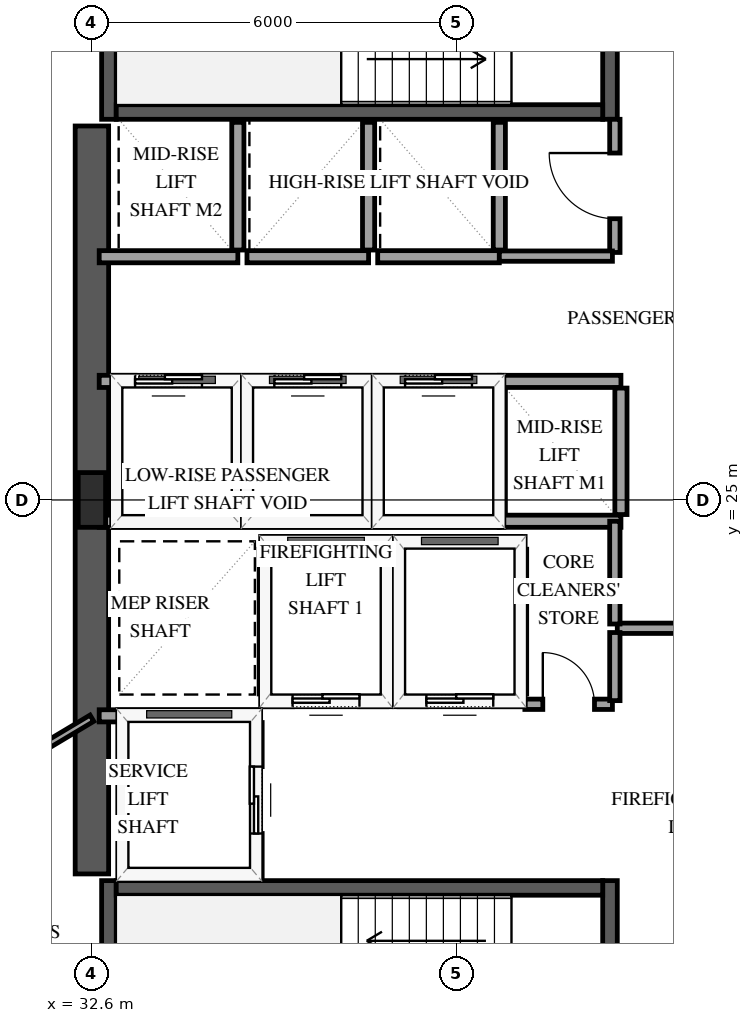
"""IFC4 building model, lengths in metres.
Left out: names, types, materials, properties, quantities, classifications, styles, units other than length and angle.
Written with IfcOpenShell. Run it as: python <this file> out.ifc"""

import sys

from ifc_helpers import new_model, si_unit, direction, frame, frame_2d, origin, origin_2d, place, context, subcontext, project, spatial, rectangle, extrude, element, fill, save


model = new_model("IFC4")
c1 = context("Model", 3, precision=1e-05, world=origin(), true_north=direction((0.0, 1.0)))
c2 = subcontext(c1, "Body", "Model", "MODEL_VIEW")
j1 = project(units=[si_unit("LENGTHUNIT", "METRE"), si_unit("PLANEANGLEUNIT", "RADIAN")], contexts=[c1])
p1 = place(None, origin())
s1 = spatial("IfcSite", under=j1, at=p1, CompositionType="ELEMENT")
p2 = place(p1, origin())
s2 = spatial("IfcBuilding", under=s1, at=p2, CompositionType="ELEMENT")
p3 = place(p2, frame((0.0, 0.0, 106.9)))
s3 = spatial("IfcBuildingStorey", under=s2, at=p3, CompositionType="ELEMENT", Elevation=106.9)
p4 = place(p3, frame((32.88, 15.11, 0.0), z_axis=(0.0, 0.0, 1.0), x_axis=(0.0, 1.0, 0.0)))
e1 = element("IfcWall", 1, at=p4, inside=s3, PredefinedType="SHEAR", context=c2, shape_type="SweptSolid", body=[
    extrude(rectangle(XDim=3.63, YDim=0.24, at=frame_2d((1.815, 0.0))), origin(), (0.0, 0.0, 1.0), 3.9),
])
p5 = place(p3, frame((41.12, 15.11, 0.0), z_axis=(0.0, 0.0, 1.0), x_axis=(0.0, 1.0, 0.0)))
e2 = element("IfcWall", 2, at=p5, inside=s3, PredefinedType="SHEAR", context=c2, shape_type="SweptSolid", body=[
    extrude(rectangle(XDim=3.63, YDim=0.24, at=frame_2d((1.815, 0.0))), origin(), (0.0, 0.0, 1.0), 3.9),
])
p6 = place(p5, frame((1.255, 0.0, 0.0)))
e3 = element("IfcOpeningElement", 3, at=p6, cuts=e2, PredefinedType="OPENING", context=c2, shape_type="SweptSolid", body=[
    extrude(rectangle(XDim=1.12, YDim=2.15, at=frame_2d((0.56, 1.075))), frame((0.0, 0.13, 0.0), z_axis=(0.0, -1.0, 0.0), x_axis=(1.0, 0.0, 0.0)), (0.0, 0.0, 1.0), 0.26),
])
p7 = place(p3, frame((33.0, 18.62, 0.0), z_axis=(0.0, 0.0, 1.0), x_axis=(1.0, 0.0, 0.0)))
e4 = element("IfcWall", 4, at=p7, inside=s3, PredefinedType="SHEAR", context=c2, shape_type="SweptSolid", body=[
    extrude(rectangle(XDim=8.0, YDim=0.24, at=frame_2d((4.0, 0.0))), origin(), (0.0, 0.0, 1.0), 3.9),
])
p8 = place(p3, frame((32.88, 31.26, 0.0), z_axis=(0.0, 0.0, 1.0), x_axis=(0.0, 1.0, 0.0)))
e5 = element("IfcWall", 5, at=p8, inside=s3, PredefinedType="SHEAR", context=c2, shape_type="SweptSolid", body=[
    extrude(rectangle(XDim=3.63, YDim=0.24, at=frame_2d((1.815, 0.0))), origin(), (0.0, 0.0, 1.0), 3.9),
])
p9 = place(p3, frame((41.12, 31.26, 0.0), z_axis=(0.0, 0.0, 1.0), x_axis=(0.0, 1.0, 0.0)))
e6 = element("IfcWall", 6, at=p9, inside=s3, PredefinedType="SHEAR", context=c2, shape_type="SweptSolid", body=[
    extrude(rectangle(XDim=3.63, YDim=0.24, at=frame_2d((1.815, 0.0))), origin(), (0.0, 0.0, 1.0), 3.9),
])
p10 = place(p9, frame((1.255, 0.0, 0.0)))
e7 = element("IfcOpeningElement", 7, at=p10, cuts=e6, PredefinedType="OPENING", context=c2, shape_type="SweptSolid", body=[
    extrude(rectangle(XDim=1.12, YDim=2.15, at=frame_2d((0.56, 1.075))), frame((0.0, 0.13, 0.0), z_axis=(0.0, -1.0, 0.0), x_axis=(1.0, 0.0, 0.0)), (0.0, 0.0, 1.0), 0.26),
])
p11 = place(p3, frame((33.0, 31.38, 0.0), z_axis=(0.0, 0.0, 1.0), x_axis=(1.0, 0.0, 0.0)))
e8 = element("IfcWall", 8, at=p11, inside=s3, PredefinedType="SHEAR", context=c2, shape_type="SweptSolid", body=[
    extrude(rectangle(XDim=8.0, YDim=0.24, at=frame_2d((4.0, 0.0))), origin(), (0.0, 0.0, 1.0), 3.9),
])
p12 = place(p3, frame((32.6, 18.85, 0.0), z_axis=(0.0, 0.0, 1.0), x_axis=(0.0, 1.0, 0.0)))
e9 = element("IfcWall", 9, at=p12, inside=s3, PredefinedType="SHEAR", context=c2, shape_type="SweptSolid", body=[
    extrude(rectangle(XDim=12.3, YDim=0.55, at=frame_2d((6.15, 0.0))), origin(), (0.0, 0.0, 1.0), 3.9),
])
p13 = place(p3, frame((32.6, 25.0, 0.0), z_axis=(0.0, 0.0, 1.0), x_axis=(1.0, 0.0, 0.0)))
e10 = element("IfcColumn", 10, at=p13, inside=s3, PredefinedType="PILASTER", context=c2, shape_type="SweptSolid", body=[
    extrude(rectangle(XDim=0.45, YDim=0.9, at=origin_2d()), origin(), (0.0, 0.0, 1.0), 3.9),
])
p14 = place(p3, frame((35.45, 21.7, 0.0), z_axis=(0.0, 0.0, 1.0), x_axis=(1.0, 0.0, 0.0)))
e11 = element("IfcWall", 11, at=p14, inside=s3, PredefinedType="SOLIDWALL", context=c2, shape_type="SweptSolid", body=[
    extrude(rectangle(XDim=2.0, YDim=0.2, at=frame_2d((1.0, 0.0))), origin(), (0.0, 0.0, 1.0), 3.6),
])
p15 = place(p14, frame((0.45, 0.0, 0.0)))
e12 = element("IfcOpeningElement", 12, at=p15, cuts=e11, PredefinedType="OPENING", context=c2, shape_type="SweptSolid", body=[
    extrude(rectangle(XDim=1.1, YDim=2.15, at=frame_2d((0.55, 1.075))), frame((0.0, 0.11, 0.0), z_axis=(0.0, -1.0, 0.0), x_axis=(1.0, 0.0, 0.0)), (0.0, 0.0, 1.0), 0.22),
])
p16 = place(p3, frame((35.45, 24.3, 0.0), z_axis=(0.0, 0.0, 1.0), x_axis=(1.0, 0.0, 0.0)))
e13 = element("IfcWall", 13, at=p16, inside=s3, PredefinedType="SOLIDWALL", context=c2, shape_type="SweptSolid", body=[
    extrude(rectangle(XDim=2.0, YDim=0.2, at=frame_2d((1.0, 0.0))), origin(), (0.0, 0.0, 1.0), 3.6),
])
for number, where, z_axis, x_axis in (
    (14, (35.45, 21.81, 0.0), (0.0, 0.0, 1.0), (0.0, 1.0, 0.0)),
    (15, (37.45, 21.81, 0.0), (0.0, 0.0, 1.0), (0.0, 1.0, 0.0)),
):
    element("IfcWall", number, at=place(p3, frame(where, z_axis=z_axis, x_axis=x_axis)), inside=s3, PredefinedType="SOLIDWALL", context=c2, shape_type="SweptSolid", body=[
        extrude(rectangle(XDim=2.38, YDim=0.2, at=frame_2d((1.19, 0.0))), origin(), (0.0, 0.0, 1.0), 3.6),
    ])
p17 = place(p3, frame((37.65, 21.7, 0.0), z_axis=(0.0, 0.0, 1.0), x_axis=(1.0, 0.0, 0.0)))
e16 = element("IfcWall", 16, at=p17, inside=s3, PredefinedType="SOLIDWALL", context=c2, shape_type="SweptSolid", body=[
    extrude(rectangle(XDim=2.0, YDim=0.2, at=frame_2d((1.0, 0.0))), origin(), (0.0, 0.0, 1.0), 3.6),
])
p18 = place(p17, frame((0.45, 0.0, 0.0)))
e17 = element("IfcOpeningElement", 17, at=p18, cuts=e16, PredefinedType="OPENING", context=c2, shape_type="SweptSolid", body=[
    extrude(rectangle(XDim=1.1, YDim=2.15, at=frame_2d((0.55, 1.075))), frame((0.0, 0.11, 0.0), z_axis=(0.0, -1.0, 0.0), x_axis=(1.0, 0.0, 0.0)), (0.0, 0.0, 1.0), 0.22),
])
p19 = place(p3, frame((37.65, 24.3, 0.0), z_axis=(0.0, 0.0, 1.0), x_axis=(1.0, 0.0, 0.0)))
e18 = element("IfcWall", 18, at=p19, inside=s3, PredefinedType="SOLIDWALL", context=c2, shape_type="SweptSolid", body=[
    extrude(rectangle(XDim=2.0, YDim=0.2, at=frame_2d((1.0, 0.0))), origin(), (0.0, 0.0, 1.0), 3.6),
])
p20 = place(p3, frame((39.65, 21.81, 0.0), z_axis=(0.0, 0.0, 1.0), x_axis=(0.0, 1.0, 0.0)))
e19 = element("IfcWall", 19, at=p20, inside=s3, PredefinedType="SOLIDWALL", context=c2, shape_type="SweptSolid", body=[
    extrude(rectangle(XDim=2.38, YDim=0.2, at=frame_2d((1.19, 0.0))), origin(), (0.0, 0.0, 1.0), 3.6),
])
p21 = place(p3, frame((32.72, 21.45, 0.0), z_axis=(0.0, 0.0, 1.0), x_axis=(1.0, 0.0, 0.0)))
e20 = element("IfcWall", 20, at=p21, inside=s3, PredefinedType="SOLIDWALL", context=c2, shape_type="SweptSolid", body=[
    extrude(rectangle(XDim=2.58, YDim=0.2, at=frame_2d((1.29, 0.0))), origin(), (0.0, 0.0, 1.0), 3.6),
])
p22 = place(p3, frame((35.3, 18.79, 0.0), z_axis=(0.0, 0.0, 1.0), x_axis=(0.0, 1.0, 0.0)))
e21 = element("IfcWall", 21, at=p22, inside=s3, PredefinedType="SOLIDWALL", context=c2, shape_type="SweptSolid", body=[
    extrude(rectangle(XDim=2.55, YDim=0.2, at=frame_2d((1.275, 0.0))), origin(), (0.0, 0.0, 1.0), 3.6),
])
p23 = place(p22, frame((0.725, 0.0, 0.0)))
e22 = element("IfcOpeningElement", 22, at=p23, cuts=e21, PredefinedType="OPENING", context=c2, shape_type="SweptSolid", body=[
    extrude(rectangle(XDim=1.1, YDim=2.15, at=frame_2d((0.55, 1.075))), frame((0.0, 0.11, 0.0), z_axis=(0.0, -1.0, 0.0), x_axis=(1.0, 0.0, 0.0)), (0.0, 0.0, 1.0), 0.22),
])
p24 = place(p3, frame((32.72, 24.65, 0.0), z_axis=(0.0, 0.0, 1.0), x_axis=(1.0, 0.0, 0.0)))
e23 = element("IfcWall", 23, at=p24, inside=s3, PredefinedType="SOLIDWALL", context=c2, shape_type="SweptSolid", body=[
    extrude(rectangle(XDim=2.28, YDim=0.2, at=frame_2d((1.14, 0.0))), origin(), (0.0, 0.0, 1.0), 3.6),
])
p25 = place(p3, frame((32.72, 26.95, 0.0), z_axis=(0.0, 0.0, 1.0), x_axis=(1.0, 0.0, 0.0)))
e24 = element("IfcWall", 24, at=p25, inside=s3, PredefinedType="SOLIDWALL", context=c2, shape_type="SweptSolid", body=[
    extrude(rectangle(XDim=2.28, YDim=0.2, at=frame_2d((1.14, 0.0))), origin(), (0.0, 0.0, 1.0), 3.6),
])
p26 = place(p25, frame((0.59, 0.0, 0.0)))
e25 = element("IfcOpeningElement", 25, at=p26, cuts=e24, PredefinedType="OPENING", context=c2, shape_type="SweptSolid", body=[
    extrude(rectangle(XDim=1.1, YDim=2.15, at=frame_2d((0.55, 1.075))), frame((0.0, 0.11, 0.0), z_axis=(0.0, -1.0, 0.0), x_axis=(1.0, 0.0, 0.0)), (0.0, 0.0, 1.0), 0.22),
])
p27 = place(p3, frame((35.0, 24.76, 0.0), z_axis=(0.0, 0.0, 1.0), x_axis=(0.0, 1.0, 0.0)))
e26 = element("IfcWall", 26, at=p27, inside=s3, PredefinedType="SOLIDWALL", context=c2, shape_type="SweptSolid", body=[
    extrude(rectangle(XDim=2.08, YDim=0.2, at=frame_2d((1.04, 0.0))), origin(), (0.0, 0.0, 1.0), 3.6),
])
p28 = place(p3, frame((35.15, 24.65, 0.0), z_axis=(0.0, 0.0, 1.0), x_axis=(1.0, 0.0, 0.0)))
e27 = element("IfcWall", 27, at=p28, inside=s3, PredefinedType="SOLIDWALL", context=c2, shape_type="SweptSolid", body=[
    extrude(rectangle(XDim=2.0, YDim=0.2, at=frame_2d((1.0, 0.0))), origin(), (0.0, 0.0, 1.0), 3.6),
])
p29 = place(p3, frame((35.15, 26.95, 0.0), z_axis=(0.0, 0.0, 1.0), x_axis=(1.0, 0.0, 0.0)))
e28 = element("IfcWall", 28, at=p29, inside=s3, PredefinedType="SOLIDWALL", context=c2, shape_type="SweptSolid", body=[
    extrude(rectangle(XDim=2.0, YDim=0.2, at=frame_2d((1.0, 0.0))), origin(), (0.0, 0.0, 1.0), 3.6),
])
p30 = place(p29, frame((0.45, 0.0, 0.0)))
e29 = element("IfcOpeningElement", 29, at=p30, cuts=e28, PredefinedType="OPENING", context=c2, shape_type="SweptSolid", body=[
    extrude(rectangle(XDim=1.1, YDim=2.15, at=frame_2d((0.55, 1.075))), frame((0.0, 0.11, 0.0), z_axis=(0.0, -1.0, 0.0), x_axis=(1.0, 0.0, 0.0)), (0.0, 0.0, 1.0), 0.22),
])
p31 = place(p3, frame((37.15, 24.76, 0.0), z_axis=(0.0, 0.0, 1.0), x_axis=(0.0, 1.0, 0.0)))
e30 = element("IfcWall", 30, at=p31, inside=s3, PredefinedType="SOLIDWALL", context=c2, shape_type="SweptSolid", body=[
    extrude(rectangle(XDim=2.08, YDim=0.2, at=frame_2d((1.04, 0.0))), origin(), (0.0, 0.0, 1.0), 3.6),
])
p32 = place(p3, frame((37.3, 24.65, 0.0), z_axis=(0.0, 0.0, 1.0), x_axis=(1.0, 0.0, 0.0)))
e31 = element("IfcWall", 31, at=p32, inside=s3, PredefinedType="SOLIDWALL", context=c2, shape_type="SweptSolid", body=[
    extrude(rectangle(XDim=2.0, YDim=0.2, at=frame_2d((1.0, 0.0))), origin(), (0.0, 0.0, 1.0), 3.6),
])
p33 = place(p3, frame((37.3, 26.95, 0.0), z_axis=(0.0, 0.0, 1.0), x_axis=(1.0, 0.0, 0.0)))
e32 = element("IfcWall", 32, at=p33, inside=s3, PredefinedType="SOLIDWALL", context=c2, shape_type="SweptSolid", body=[
    extrude(rectangle(XDim=2.0, YDim=0.2, at=frame_2d((1.0, 0.0))), origin(), (0.0, 0.0, 1.0), 3.6),
])
p34 = place(p33, frame((0.45, 0.0, 0.0)))
e33 = element("IfcOpeningElement", 33, at=p34, cuts=e32, PredefinedType="OPENING", context=c2, shape_type="SweptSolid", body=[
    extrude(rectangle(XDim=1.1, YDim=2.15, at=frame_2d((0.55, 1.075))), frame((0.0, 0.11, 0.0), z_axis=(0.0, -1.0, 0.0), x_axis=(1.0, 0.0, 0.0)), (0.0, 0.0, 1.0), 0.22),
])
p35 = place(p3, frame((39.3, 24.76, 0.0), z_axis=(0.0, 0.0, 1.0), x_axis=(0.0, 1.0, 0.0)))
e34 = element("IfcWall", 34, at=p35, inside=s3, PredefinedType="SOLIDWALL", context=c2, shape_type="SweptSolid", body=[
    extrude(rectangle(XDim=2.08, YDim=0.2, at=frame_2d((1.04, 0.0))), origin(), (0.0, 0.0, 1.0), 3.6),
])
for number, where, z_axis, x_axis in (
    (35, (39.3, 24.65, 0.0), (0.0, 0.0, 1.0), (1.0, 0.0, 0.0)),
    (36, (39.3, 26.95, 0.0), (0.0, 0.0, 1.0), (1.0, 0.0, 0.0)),
):
    element("IfcWall", number, at=place(p3, frame(where, z_axis=z_axis, x_axis=x_axis)), inside=s3, PredefinedType="SOLIDWALL", context=c2, shape_type="SweptSolid", body=[
        extrude(rectangle(XDim=2.0, YDim=0.2, at=frame_2d((1.0, 0.0))), origin(), (0.0, 0.0, 1.0), 3.6),
    ])
p36 = place(p3, frame((41.3, 24.76, 0.0), z_axis=(0.0, 0.0, 1.0), x_axis=(0.0, 1.0, 0.0)))
e37 = element("IfcWall", 37, at=p36, inside=s3, PredefinedType="SOLIDWALL", context=c2, shape_type="SweptSolid", body=[
    extrude(rectangle(XDim=2.08, YDim=0.2, at=frame_2d((1.04, 0.0))), origin(), (0.0, 0.0, 1.0), 3.6),
])
p37 = place(p3, frame((32.72, 29.0, 0.0), z_axis=(0.0, 0.0, 1.0), x_axis=(1.0, 0.0, 0.0)))
e38 = element("IfcWall", 38, at=p37, inside=s3, PredefinedType="SOLIDWALL", context=c2, shape_type="SweptSolid", body=[
    extrude(rectangle(XDim=2.28, YDim=0.2, at=frame_2d((1.14, 0.0))), origin(), (0.0, 0.0, 1.0), 3.6),
])
p38 = place(p3, frame((35.0, 29.11, 0.0), z_axis=(0.0, 0.0, 1.0), x_axis=(0.0, 1.0, 0.0)))
e39 = element("IfcWall", 39, at=p38, inside=s3, PredefinedType="SOLIDWALL", context=c2, shape_type="SweptSolid", body=[
    extrude(rectangle(XDim=2.1, YDim=0.2, at=frame_2d((1.05, 0.0))), origin(), (0.0, 0.0, 1.0), 3.6),
])
p39 = place(p3, frame((35.15, 29.0, 0.0), z_axis=(0.0, 0.0, 1.0), x_axis=(1.0, 0.0, 0.0)))
e40 = element("IfcWall", 40, at=p39, inside=s3, PredefinedType="SOLIDWALL", context=c2, shape_type="SweptSolid", body=[
    extrude(rectangle(XDim=2.0, YDim=0.2, at=frame_2d((1.0, 0.0))), origin(), (0.0, 0.0, 1.0), 3.6),
])
p40 = place(p3, frame((37.15, 29.11, 0.0), z_axis=(0.0, 0.0, 1.0), x_axis=(0.0, 1.0, 0.0)))
e41 = element("IfcWall", 41, at=p40, inside=s3, PredefinedType="SOLIDWALL", context=c2, shape_type="SweptSolid", body=[
    extrude(rectangle(XDim=2.1, YDim=0.2, at=frame_2d((1.05, 0.0))), origin(), (0.0, 0.0, 1.0), 3.6),
])
p41 = place(p3, frame((37.3, 29.0, 0.0), z_axis=(0.0, 0.0, 1.0), x_axis=(1.0, 0.0, 0.0)))
e42 = element("IfcWall", 42, at=p41, inside=s3, PredefinedType="SOLIDWALL", context=c2, shape_type="SweptSolid", body=[
    extrude(rectangle(XDim=2.0, YDim=0.2, at=frame_2d((1.0, 0.0))), origin(), (0.0, 0.0, 1.0), 3.6),
])
p42 = place(p3, frame((39.3, 29.11, 0.0), z_axis=(0.0, 0.0, 1.0), x_axis=(0.0, 1.0, 0.0)))
e43 = element("IfcWall", 43, at=p42, inside=s3, PredefinedType="SOLIDWALL", context=c2, shape_type="SweptSolid", body=[
    extrude(rectangle(XDim=2.1, YDim=0.2, at=frame_2d((1.05, 0.0))), origin(), (0.0, 0.0, 1.0), 3.6),
])
p43 = place(p3, frame((32.6, 21.411, 0.0), z_axis=(0.0, 0.0, 1.0), x_axis=(-0.858297424283, -0.513152542105, 0.0)))
e44 = element("IfcWall", 44, at=p43, inside=s3, PredefinedType="PARTITIONING", context=c2, shape_type="SweptSolid", body=[
    extrude(rectangle(XDim=6.177, YDim=0.12, at=frame_2d((3.089, 0.0))), origin(), (0.0, 0.0, 1.0), 3.6),
])
p44 = place(p3, frame((41.24, 22.89, 0.0), z_axis=(0.0, 0.0, 1.0), x_axis=(1.0, 0.0, 0.0)))
e45 = element("IfcWall", 45, at=p44, inside=s3, PredefinedType="PARTITIONING", context=c2, shape_type="SweptSolid", body=[
    extrude(rectangle(XDim=3.32, YDim=0.17, at=frame_2d((1.66, 0.0))), origin(), (0.0, 0.0, 1.0), 3.6),
])
p45 = place(p44, frame((1.12, 0.0, 0.0)))
e46 = element("IfcOpeningElement", 46, at=p45, cuts=e45, PredefinedType="OPENING", context=c2, shape_type="SweptSolid", body=[
    extrude(rectangle(XDim=1.08, YDim=2.15, at=frame_2d((0.54, 1.075))), frame((0.0, 0.095, 0.0), z_axis=(0.0, -1.0, 0.0), x_axis=(1.0, 0.0, 0.0)), (0.0, 0.0, 1.0), 0.19),
])
p46 = place(p3, frame((41.2, 29.07, 0.0), z_axis=(0.0, 0.0, 1.0), x_axis=(0.0, 1.0, 0.0)))
e47 = element("IfcWall", 47, at=p46, inside=s3, PredefinedType="PARTITIONING", context=c2, shape_type="SweptSolid", body=[
    extrude(rectangle(XDim=2.19, YDim=0.17, at=frame_2d((1.095, 0.0))), origin(), (0.0, 0.0, 1.0), 3.6),
])
p47 = place(p46, frame((0.555, 0.0, 0.0)))
e48 = element("IfcOpeningElement", 48, at=p47, cuts=e47, PredefinedType="OPENING", context=c2, shape_type="SweptSolid", body=[
    extrude(rectangle(XDim=1.08, YDim=2.15, at=frame_2d((0.54, 1.075))), frame((0.0, 0.095, 0.0), z_axis=(0.0, -1.0, 0.0), x_axis=(1.0, 0.0, 0.0)), (0.0, 0.0, 1.0), 0.19),
])
p48 = place(p3, frame((39.3, 29.01, 0.0), z_axis=(0.0, 0.0, 1.0), x_axis=(1.0, 0.0, 0.0)))
e49 = element("IfcWall", 49, at=p48, inside=s3, PredefinedType="PARTITIONING", context=c2, shape_type="SweptSolid", body=[
    extrude(rectangle(XDim=1.86, YDim=0.17, at=frame_2d((0.93, 0.0))), origin(), (0.0, 0.0, 1.0), 3.6),
])
p49 = place(p3, frame((41.2, 22.96, 0.0), z_axis=(0.0, 0.0, 1.0), x_axis=(0.0, 1.0, 0.0)))
e50 = element("IfcWall", 50, at=p49, inside=s3, PredefinedType="PARTITIONING", context=c2, shape_type="SweptSolid", body=[
    extrude(rectangle(XDim=1.69, YDim=0.17, at=frame_2d((0.845, 0.0))), origin(), (0.0, 0.0, 1.0), 3.6),
])
p50 = place(p3, frame((39.72, 21.64, 0.0), z_axis=(0.0, 0.0, 1.0), x_axis=(1.0, 0.0, 0.0)))
e51 = element("IfcWall", 51, at=p50, inside=s3, PredefinedType="PARTITIONING", context=c2, shape_type="SweptSolid", body=[
    extrude(rectangle(XDim=1.44, YDim=0.17, at=frame_2d((0.72, 0.0))), origin(), (0.0, 0.0, 1.0), 3.6),
])
p51 = place(p50, frame((0.295, 0.0, 0.0)))
e52 = element("IfcOpeningElement", 52, at=p51, cuts=e51, PredefinedType="OPENING", context=c2, shape_type="SweptSolid", body=[
    extrude(rectangle(XDim=0.85, YDim=2.1, at=frame_2d((0.425, 1.05))), frame((0.0, 0.095, 0.0), z_axis=(0.0, -1.0, 0.0), x_axis=(1.0, 0.0, 0.0)), (0.0, 0.0, 1.0), 0.19),
])
p52 = place(p3, frame((41.2, 21.7, 0.0), z_axis=(0.0, 0.0, 1.0), x_axis=(0.0, 1.0, 0.0)))
e53 = element("IfcWall", 53, at=p52, inside=s3, PredefinedType="PARTITIONING", context=c2, shape_type="SweptSolid", body=[
    extrude(rectangle(XDim=1.12, YDim=0.17, at=frame_2d((0.56, 0.0))), origin(), (0.0, 0.0, 1.0), 3.6),
])
p53 = place(p15, origin())
e54 = element("IfcDoor", 54, at=p53, inside=s3, OperationType="SLIDING_TO_LEFT", PredefinedType="DOOR", context=c2, shape_type="SweptSolid", body=[
    extrude(rectangle(XDim=1.1, YDim=2.15, at=frame_2d((0.55, 1.075))), frame((0.0, 0.025, 0.0), z_axis=(0.0, -1.0, 0.0), x_axis=(1.0, 0.0, 0.0)), (0.0, 0.0, 1.0), 0.05),
])
fill(e12, e54)
p54 = place(p18, origin())
e55 = element("IfcDoor", 55, at=p54, inside=s3, OperationType="SLIDING_TO_LEFT", PredefinedType="DOOR", context=c2, shape_type="SweptSolid", body=[
    extrude(rectangle(XDim=1.1, YDim=2.15, at=frame_2d((0.55, 1.075))), frame((0.0, 0.025, 0.0), z_axis=(0.0, -1.0, 0.0), x_axis=(1.0, 0.0, 0.0)), (0.0, 0.0, 1.0), 0.05),
])
fill(e17, e55)
p55 = place(p23, origin())
e56 = element("IfcDoor", 56, at=p55, inside=s3, OperationType="SLIDING_TO_LEFT", PredefinedType="DOOR", context=c2, shape_type="SweptSolid", body=[
    extrude(rectangle(XDim=1.1, YDim=2.15, at=frame_2d((0.55, 1.075))), frame((0.0, 0.025, 0.0), z_axis=(0.0, -1.0, 0.0), x_axis=(1.0, 0.0, 0.0)), (0.0, 0.0, 1.0), 0.05),
])
fill(e22, e56)
p56 = place(p26, origin())
e57 = element("IfcDoor", 57, at=p56, inside=s3, OperationType="SLIDING_TO_LEFT", PredefinedType="DOOR", context=c2, shape_type="SweptSolid", body=[
    extrude(rectangle(XDim=1.1, YDim=2.15, at=frame_2d((0.55, 1.075))), frame((0.0, 0.025, 0.0), z_axis=(0.0, -1.0, 0.0), x_axis=(1.0, 0.0, 0.0)), (0.0, 0.0, 1.0), 0.05),
])
fill(e25, e57)
p57 = place(p30, origin())
e58 = element("IfcDoor", 58, at=p57, inside=s3, OperationType="SLIDING_TO_LEFT", PredefinedType="DOOR", context=c2, shape_type="SweptSolid", body=[
    extrude(rectangle(XDim=1.1, YDim=2.15, at=frame_2d((0.55, 1.075))), frame((0.0, 0.025, 0.0), z_axis=(0.0, -1.0, 0.0), x_axis=(1.0, 0.0, 0.0)), (0.0, 0.0, 1.0), 0.05),
])
fill(e29, e58)
p58 = place(p34, origin())
e59 = element("IfcDoor", 59, at=p58, inside=s3, OperationType="SLIDING_TO_LEFT", PredefinedType="DOOR", context=c2, shape_type="SweptSolid", body=[
    extrude(rectangle(XDim=1.1, YDim=2.15, at=frame_2d((0.55, 1.075))), frame((0.0, 0.025, 0.0), z_axis=(0.0, -1.0, 0.0), x_axis=(1.0, 0.0, 0.0)), (0.0, 0.0, 1.0), 0.05),
])
fill(e33, e59)
p59 = place(p47, origin())
e60 = element("IfcDoor", 60, at=p59, inside=s3, OperationType="SINGLE_SWING_RIGHT", PredefinedType="DOOR", context=c2, shape_type="SweptSolid", body=[
    extrude(rectangle(XDim=1.08, YDim=2.15, at=frame_2d((0.54, 1.075))), frame((0.0, 0.025, 0.0), z_axis=(0.0, -1.0, 0.0), x_axis=(1.0, 0.0, 0.0)), (0.0, 0.0, 1.0), 0.05),
])
fill(e48, e60)
p60 = place(p51, origin())
e61 = element("IfcDoor", 61, at=p60, inside=s3, OperationType="SINGLE_SWING_LEFT", PredefinedType="DOOR", context=c2, shape_type="SweptSolid", body=[
    extrude(rectangle(XDim=0.85, YDim=2.1, at=frame_2d((0.425, 1.05))), frame((0.0, 0.025, 0.0), z_axis=(0.0, -1.0, 0.0), x_axis=(1.0, 0.0, 0.0)), (0.0, 0.0, 1.0), 0.05),
])
fill(e52, e61)
save(model, sys.argv[1])
